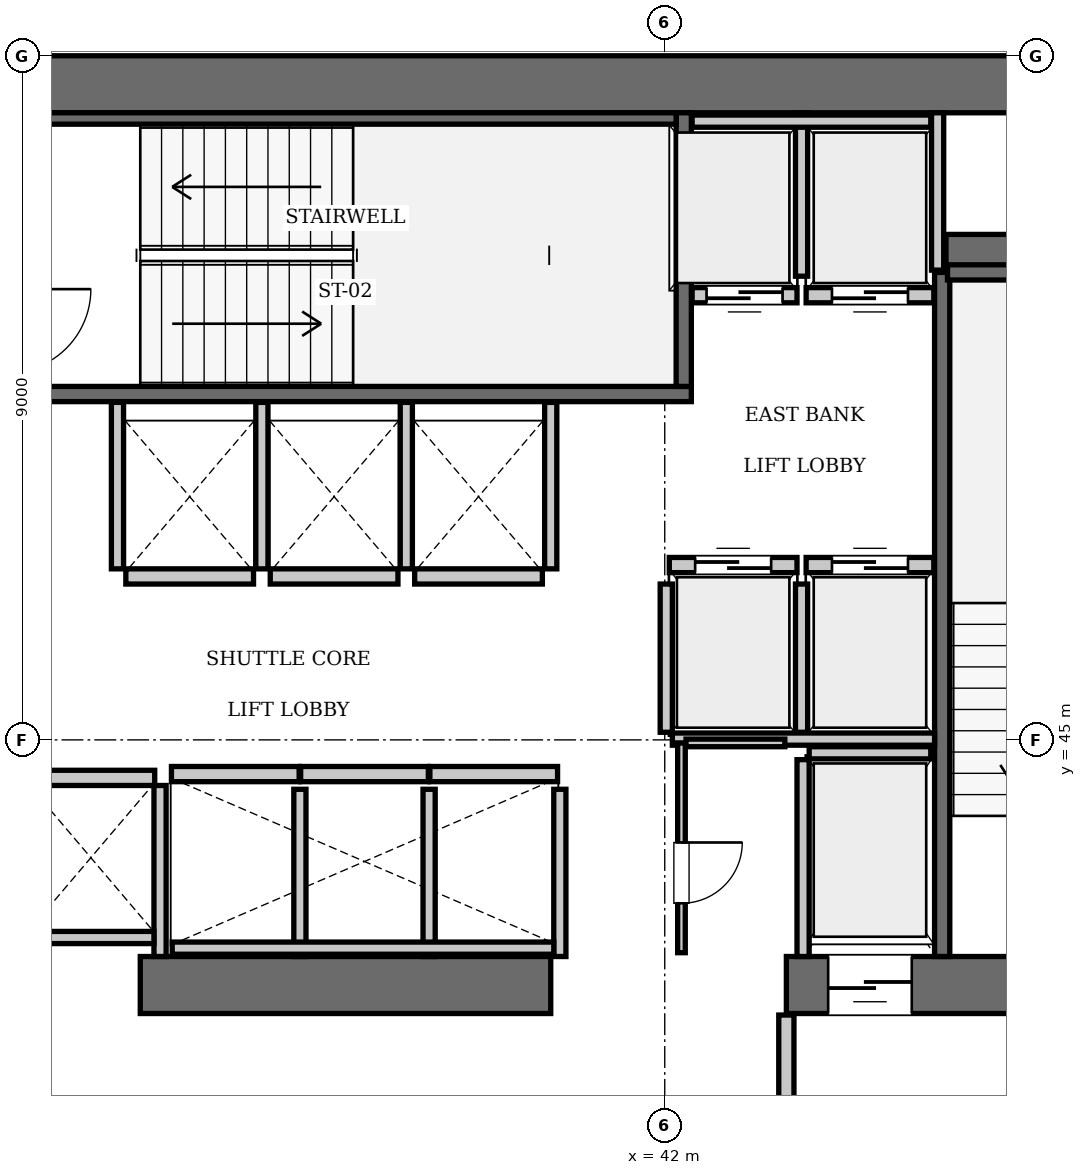
"""IFC4 building model, lengths in metres.
Left out: names, types, materials, properties, quantities, classifications, styles, units other than length and angle.
Written with IfcOpenShell. Run it as: python <this file> out.ifc"""

import sys

from ifc_helpers import new_model, si_unit, direction, frame, frame_2d, origin, place, context, subcontext, project, spatial, rectangle, extrude, element, fill, save


model = new_model("IFC4")
c1 = context("Model", 3, precision=1e-05, world=origin(), true_north=direction((0.0, 1.0)))
c2 = subcontext(c1, "Body", "Model", "MODEL_VIEW")
j1 = project(units=[si_unit("LENGTHUNIT", "METRE"), si_unit("PLANEANGLEUNIT", "RADIAN")], contexts=[c1])
p1 = place(None, origin())
s1 = spatial("IfcSite", under=j1, at=p1, CompositionType="ELEMENT")
p2 = place(p1, origin())
s2 = spatial("IfcBuilding", under=s1, at=p2, CompositionType="ELEMENT")
p3 = place(p2, frame((0.0, 0.0, 142.8)))
s3 = spatial("IfcBuildingStorey", under=s2, at=p3, CompositionType="ELEMENT", Elevation=142.8)
p4 = place(p3, frame((25.2, 53.625, 0.0), z_axis=(0.0, 0.0, 1.0), x_axis=(1.0, 0.0, 0.0)))
e1 = element("IfcWall", 1, at=p4, inside=s3, PredefinedType="SHEAR", context=c2, shape_type="SweptSolid", body=[
    extrude(rectangle(XDim=25.2, YDim=0.75, at=frame_2d((12.6, 0.0))), origin(), (0.0, 0.0, 1.0), 3.85),
])
p5 = place(p3, frame((35.1, 41.775, 0.0), z_axis=(0.0, 0.0, 1.0), x_axis=(1.0, 0.0, 0.0)))
e2 = element("IfcWall", 2, at=p5, inside=s3, PredefinedType="SHEAR", context=c2, shape_type="SweptSolid", body=[
    extrude(rectangle(XDim=5.4, YDim=0.75, at=frame_2d((2.7, 0.0))), origin(), (0.0, 0.0, 1.0), 3.85),
])
p6 = place(p3, frame((43.6, 41.775, 0.0), z_axis=(0.0, 0.0, 1.0), x_axis=(1.0, 0.0, 0.0)))
e3 = element("IfcWall", 3, at=p6, inside=s3, PredefinedType="SHEAR", context=c2, shape_type="SweptSolid", body=[
    extrude(rectangle(XDim=6.8, YDim=0.75, at=frame_2d((3.4, 0.0))), origin(), (0.0, 0.0, 1.0), 3.85),
])
p7 = place(p6, frame((3.9, 0.0, 0.0)))
e4 = element("IfcOpeningElement", 4, at=p7, cuts=e3, PredefinedType="OPENING", context=c2, shape_type="SweptSolid", body=[
    extrude(rectangle(XDim=1.15, YDim=2.15, at=frame_2d((0.575, 1.075))), frame((0.0, 0.385, 0.0), z_axis=(0.0, -1.0, 0.0), x_axis=(1.0, 0.0, 0.0)), (0.0, 0.0, 1.0), 0.77),
])
p8 = place(p6, frame((0.55, 0.0, 0.0)))
e5 = element("IfcOpeningElement", 5, at=p8, cuts=e3, PredefinedType="OPENING", context=c2, shape_type="SweptSolid", body=[
    extrude(rectangle(XDim=1.1, YDim=2.2, at=frame_2d((0.55, 1.1))), frame((0.0, 0.385, 0.0), z_axis=(0.0, -1.0, 0.0), x_axis=(1.0, 0.0, 0.0)), (0.0, 0.0, 1.0), 0.77),
])
p9 = place(p3, frame((45.7, 51.4, 0.0), z_axis=(0.0, 0.0, 1.0), x_axis=(1.0, 0.0, 0.0)))
e6 = element("IfcWall", 6, at=p9, inside=s3, PredefinedType="SHEAR", context=c2, shape_type="SweptSolid", body=[
    extrude(rectangle(XDim=3.95, YDim=0.5, at=frame_2d((1.975, 0.0))), origin(), (0.0, 0.0, 1.0), 3.85),
])
p10 = place(p3, frame((33.25, 49.55, 0.0), z_axis=(0.0, 0.0, 1.0), x_axis=(1.0, 0.0, 0.0)))
e7 = element("IfcWall", 7, at=p10, inside=s3, PredefinedType="SOLIDWALL", context=c2, shape_type="SweptSolid", body=[
    extrude(rectangle(XDim=9.1, YDim=0.2, at=frame_2d((4.55, 0.0))), origin(), (0.0, 0.0, 1.0), 3.61),
])
p11 = place(p3, frame((42.25, 49.65, 0.0), z_axis=(0.0, 0.0, 1.0), x_axis=(0.0, 1.0, 0.0)))
e8 = element("IfcWall", 8, at=p11, inside=s3, PredefinedType="SOLIDWALL", context=c2, shape_type="SweptSolid", body=[
    extrude(rectangle(XDim=3.6, YDim=0.2, at=frame_2d((1.8, 0.0))), origin(), (0.0, 0.0, 1.0), 3.61),
])
p12 = place(p3, frame((33.45, 53.175, 0.0), z_axis=(0.0, 0.0, 1.0), x_axis=(1.0, 0.0, 0.0)))
e9 = element("IfcWall", 9, at=p12, inside=s3, PredefinedType="SOLIDWALL", context=c2, shape_type="SweptSolid", body=[
    extrude(rectangle(XDim=8.7, YDim=0.15, at=frame_2d((4.35, 0.0))), origin(), (0.0, 0.0, 1.0), 3.61),
])
p13 = place(p3, frame((45.65, 42.15, 0.0), z_axis=(0.0, 0.0, 1.0), x_axis=(0.0, 1.0, 0.0)))
e10 = element("IfcWall", 10, at=p13, inside=s3, PredefinedType="SOLIDWALL", context=c2, shape_type="SweptSolid", body=[
    extrude(rectangle(XDim=9.0, YDim=0.2, at=frame_2d((4.5, 0.0))), origin(), (0.0, 0.0, 1.0), 3.61),
])
p14 = place(p3, frame((45.72, 51.15, 0.0), z_axis=(0.0, 0.0, 1.0), x_axis=(1.0, 0.0, 0.0)))
e11 = element("IfcWall", 11, at=p14, inside=s3, PredefinedType="SOLIDWALL", context=c2, shape_type="SweptSolid", body=[
    extrude(rectangle(XDim=3.5, YDim=0.2, at=frame_2d((1.75, 0.0))), origin(), (0.0, 0.0, 1.0), 3.61),
])
p15 = place(p3, frame((42.06, 47.3, 0.0), z_axis=(0.0, 0.0, 1.0), x_axis=(1.0, 0.0, 0.0)))
e12 = element("IfcWall", 12, at=p15, inside=s3, PredefinedType="SOLIDWALL", context=c2, shape_type="SweptSolid", body=[
    extrude(rectangle(XDim=1.68, YDim=0.2, at=frame_2d((0.84, 0.0))), origin(), (0.0, 0.0, 1.0), 3.61),
])
p16 = place(p15, frame((0.34, 0.0, 0.0)))
e13 = element("IfcOpeningElement", 13, at=p16, cuts=e12, PredefinedType="OPENING", context=c2, shape_type="SweptSolid", body=[
    extrude(rectangle(XDim=1.0, YDim=2.15, at=frame_2d((0.5, 1.075))), frame((0.0, 0.11, 0.0), z_axis=(0.0, -1.0, 0.0), x_axis=(1.0, 0.0, 0.0)), (0.0, 0.0, 1.0), 0.22),
])
p17 = place(p3, frame((43.86, 47.3, 0.0), z_axis=(0.0, 0.0, 1.0), x_axis=(1.0, 0.0, 0.0)))
e14 = element("IfcWall", 14, at=p17, inside=s3, PredefinedType="SOLIDWALL", context=c2, shape_type="SweptSolid", body=[
    extrude(rectangle(XDim=1.68, YDim=0.2, at=frame_2d((0.84, 0.0))), origin(), (0.0, 0.0, 1.0), 3.61),
])
p18 = place(p17, frame((0.34, 0.0, 0.0)))
e15 = element("IfcOpeningElement", 15, at=p18, cuts=e14, PredefinedType="OPENING", context=c2, shape_type="SweptSolid", body=[
    extrude(rectangle(XDim=1.0, YDim=2.15, at=frame_2d((0.5, 1.075))), frame((0.0, 0.11, 0.0), z_axis=(0.0, -1.0, 0.0), x_axis=(1.0, 0.0, 0.0)), (0.0, 0.0, 1.0), 0.22),
])
p19 = place(p3, frame((42.36, 50.85, 0.0), z_axis=(0.0, 0.0, 1.0), x_axis=(1.0, 0.0, 0.0)))
e16 = element("IfcWall", 16, at=p19, inside=s3, PredefinedType="SOLIDWALL", context=c2, shape_type="SweptSolid", body=[
    extrude(rectangle(XDim=1.38, YDim=0.2, at=frame_2d((0.69, 0.0))), origin(), (0.0, 0.0, 1.0), 3.61),
])
p20 = place(p19, frame((0.19, 0.0, 0.0)))
e17 = element("IfcOpeningElement", 17, at=p20, cuts=e16, PredefinedType="OPENING", context=c2, shape_type="SweptSolid", body=[
    extrude(rectangle(XDim=1.0, YDim=2.15, at=frame_2d((0.5, 1.075))), frame((0.0, 0.11, 0.0), z_axis=(0.0, -1.0, 0.0), x_axis=(1.0, 0.0, 0.0)), (0.0, 0.0, 1.0), 0.22),
])
p21 = place(p3, frame((43.86, 50.85, 0.0), z_axis=(0.0, 0.0, 1.0), x_axis=(1.0, 0.0, 0.0)))
e18 = element("IfcWall", 18, at=p21, inside=s3, PredefinedType="SOLIDWALL", context=c2, shape_type="SweptSolid", body=[
    extrude(rectangle(XDim=1.68, YDim=0.2, at=frame_2d((0.84, 0.0))), origin(), (0.0, 0.0, 1.0), 3.61),
])
p22 = place(p21, frame((0.34, 0.0, 0.0)))
e19 = element("IfcOpeningElement", 19, at=p22, cuts=e18, PredefinedType="OPENING", context=c2, shape_type="SweptSolid", body=[
    extrude(rectangle(XDim=1.0, YDim=2.15, at=frame_2d((0.5, 1.075))), frame((0.0, 0.11, 0.0), z_axis=(0.0, -1.0, 0.0), x_axis=(1.0, 0.0, 0.0)), (0.0, 0.0, 1.0), 0.22),
])
for number, where, z_axis, x_axis in (
    (20, (35.51, 44.55, 0.0), (0.0, 0.0, 1.0), (1.0, 0.0, 0.0)),
    (21, (37.21, 44.55, 0.0), (0.0, 0.0, 1.0), (1.0, 0.0, 0.0)),
):
    element("IfcWall", number, at=place(p3, frame(where, z_axis=z_axis, x_axis=x_axis)), inside=s3, PredefinedType="SOLIDWALL", context=c2, shape_type="SweptSolid", body=[
        extrude(rectangle(XDim=1.68, YDim=0.2, at=frame_2d((0.84, 0.0))), origin(), (0.0, 0.0, 1.0), 3.61),
    ])
for number, where, z_axis, x_axis in (
    (22, (38.91, 44.55, 0.0), (0.0, 0.0, 1.0), (1.0, 0.0, 0.0)),
    (23, (34.91, 47.15, 0.0), (0.0, 0.0, 1.0), (1.0, 0.0, 0.0)),
):
    element("IfcWall", number, at=place(p3, frame(where, z_axis=z_axis, x_axis=x_axis)), inside=s3, PredefinedType="SOLIDWALL", context=c2, shape_type="SweptSolid", body=[
        extrude(rectangle(XDim=1.68, YDim=0.2, at=frame_2d((0.84, 0.0))), origin(), (0.0, 0.0, 1.0), 3.61),
    ])
for number, where, z_axis, x_axis in (
    (24, (36.81, 47.15, 0.0), (0.0, 0.0, 1.0), (1.0, 0.0, 0.0)),
    (25, (38.71, 47.15, 0.0), (0.0, 0.0, 1.0), (1.0, 0.0, 0.0)),
    (26, (33.61, 44.5, 0.0), (0.0, 0.0, 1.0), (1.0, 0.0, 0.0)),
):
    element("IfcWall", number, at=place(p3, frame(where, z_axis=z_axis, x_axis=x_axis)), inside=s3, PredefinedType="SOLIDWALL", context=c2, shape_type="SweptSolid", body=[
        extrude(rectangle(XDim=1.68, YDim=0.2, at=frame_2d((0.84, 0.0))), origin(), (0.0, 0.0, 1.0), 3.61),
    ])
p23 = place(p3, frame((43.9, 44.83, 0.0), z_axis=(0.0, 0.0, 1.0), x_axis=(1.0, 0.0, 0.0)))
e27 = element("IfcWall", 27, at=p23, inside=s3, PredefinedType="SOLIDWALL", context=c2, shape_type="SweptSolid", body=[
    extrude(rectangle(XDim=1.6, YDim=0.16, at=frame_2d((0.8, 0.0))), origin(), (0.0, 0.0, 1.0), 3.61),
])
p24 = place(p3, frame((43.82, 42.15, 0.0), z_axis=(0.0, 0.0, 1.0), x_axis=(0.0, 1.0, 0.0)))
e28 = element("IfcWall", 28, at=p24, inside=s3, PredefinedType="SOLIDWALL", context=c2, shape_type="SweptSolid", body=[
    extrude(rectangle(XDim=2.59, YDim=0.16, at=frame_2d((1.295, 0.0))), origin(), (0.0, 0.0, 1.0), 3.61),
])
for number, where, z_axis, x_axis in (
    (29, (42.02, 45.1, 0.0), (0.0, 0.0, 1.0), (0.0, 1.0, 0.0)),
    (30, (43.8, 45.1, 0.0), (0.0, 0.0, 1.0), (0.0, 1.0, 0.0)),
):
    element("IfcWall", number, at=place(p3, frame(where, z_axis=z_axis, x_axis=x_axis)), inside=s3, PredefinedType="SOLIDWALL", context=c2, shape_type="SweptSolid", body=[
        extrude(rectangle(XDim=1.95, YDim=0.16, at=frame_2d((0.975, 0.0))), origin(), (0.0, 0.0, 1.0), 3.61),
    ])
p25 = place(p3, frame((42.1, 45.01, 0.0), z_axis=(0.0, 0.0, 1.0), x_axis=(1.0, 0.0, 0.0)))
e31 = element("IfcWall", 31, at=p25, inside=s3, PredefinedType="SOLIDWALL", context=c2, shape_type="SweptSolid", body=[
    extrude(rectangle(XDim=3.45, YDim=0.16, at=frame_2d((1.725, 0.0))), origin(), (0.0, 0.0, 1.0), 3.61),
])
p26 = place(p3, frame((45.59, 51.18, 0.0), z_axis=(0.0, 0.0, 1.0), x_axis=(0.0, 1.0, 0.0)))
e32 = element("IfcWall", 32, at=p26, inside=s3, PredefinedType="SOLIDWALL", context=c2, shape_type="SweptSolid", body=[
    extrude(rectangle(XDim=2.07, YDim=0.16, at=frame_2d((1.035, 0.0))), origin(), (0.0, 0.0, 1.0), 3.61),
])
p27 = place(p3, frame((43.8, 51.1, 0.0), z_axis=(0.0, 0.0, 1.0), x_axis=(0.0, 1.0, 0.0)))
e33 = element("IfcWall", 33, at=p27, inside=s3, PredefinedType="SOLIDWALL", context=c2, shape_type="SweptSolid", body=[
    extrude(rectangle(XDim=2.15, YDim=0.16, at=frame_2d((1.075, 0.0))), origin(), (0.0, 0.0, 1.0), 3.61),
])
p28 = place(p3, frame((42.36, 53.14, 0.0), z_axis=(0.0, 0.0, 1.0), x_axis=(1.0, 0.0, 0.0)))
e34 = element("IfcWall", 34, at=p28, inside=s3, PredefinedType="SOLIDWALL", context=c2, shape_type="SweptSolid", body=[
    extrude(rectangle(XDim=3.14, YDim=0.16, at=frame_2d((1.57, 0.0))), origin(), (0.0, 0.0, 1.0), 3.61),
])
for number, where, z_axis, x_axis in (
    (35, (37.2, 42.15, 0.0), (0.0, 0.0, 1.0), (0.0, 1.0, 0.0)),
    (36, (38.9, 42.15, 0.0), (0.0, 0.0, 1.0), (0.0, 1.0, 0.0)),
    (37, (40.62, 42.15, 0.0), (0.0, 0.0, 1.0), (0.0, 1.0, 0.0)),
):
    element("IfcWall", number, at=place(p3, frame(where, z_axis=z_axis, x_axis=x_axis)), inside=s3, PredefinedType="SOLIDWALL", context=c2, shape_type="SweptSolid", body=[
        extrude(rectangle(XDim=2.2, YDim=0.16, at=frame_2d((1.1, 0.0))), origin(), (0.0, 0.0, 1.0), 3.61),
    ])
p29 = place(p3, frame((35.52, 42.26, 0.0), z_axis=(0.0, 0.0, 1.0), x_axis=(1.0, 0.0, 0.0)))
e38 = element("IfcWall", 38, at=p29, inside=s3, PredefinedType="SOLIDWALL", context=c2, shape_type="SweptSolid", body=[
    extrude(rectangle(XDim=5.02, YDim=0.16, at=frame_2d((2.51, 0.0))), origin(), (0.0, 0.0, 1.0), 3.61),
])
for number, where, z_axis, x_axis in (
    (39, (34.8, 47.25, 0.0), (0.0, 0.0, 1.0), (0.0, 1.0, 0.0)),
    (40, (36.7, 47.25, 0.0), (0.0, 0.0, 1.0), (0.0, 1.0, 0.0)),
    (41, (38.6, 47.25, 0.0), (0.0, 0.0, 1.0), (0.0, 1.0, 0.0)),
    (42, (40.5, 47.25, 0.0), (0.0, 0.0, 1.0), (0.0, 1.0, 0.0)),
):
    element("IfcWall", number, at=place(p3, frame(where, z_axis=z_axis, x_axis=x_axis)), inside=s3, PredefinedType="SOLIDWALL", context=c2, shape_type="SweptSolid", body=[
        extrude(rectangle(XDim=2.19, YDim=0.16, at=frame_2d((1.095, 0.0))), origin(), (0.0, 0.0, 1.0), 3.61),
    ])
p30 = place(p3, frame((35.36, 42.15, 0.0), z_axis=(0.0, 0.0, 1.0), x_axis=(0.0, 1.0, 0.0)))
e43 = element("IfcWall", 43, at=p30, inside=s3, PredefinedType="SOLIDWALL", context=c2, shape_type="SweptSolid", body=[
    extrude(rectangle(XDim=2.25, YDim=0.16, at=frame_2d((1.125, 0.0))), origin(), (0.0, 0.0, 1.0), 3.61),
])
p31 = place(p3, frame((33.62, 42.4, 0.0), z_axis=(0.0, 0.0, 1.0), x_axis=(1.0, 0.0, 0.0)))
e44 = element("IfcWall", 44, at=p31, inside=s3, PredefinedType="SOLIDWALL", context=c2, shape_type="SweptSolid", body=[
    extrude(rectangle(XDim=1.66, YDim=0.16, at=frame_2d((0.83, 0.0))), origin(), (0.0, 0.0, 1.0), 3.61),
])
p32 = place(p3, frame((43.6, 38.31, 0.0), z_axis=(0.0, 0.0, 1.0), x_axis=(0.0, 1.0, 0.0)))
e45 = element("IfcWall", 45, at=p32, inside=s3, PredefinedType="PARTITIONING", context=c2, shape_type="SweptSolid", body=[
    extrude(rectangle(XDim=3.07, YDim=0.2, at=frame_2d((1.535, 0.0))), origin(), (0.0, 0.0, 1.0), 3.61),
])
p33 = place(p3, frame((42.22, 42.2, 0.0), z_axis=(0.0, 0.0, 1.0), x_axis=(0.0, 1.0, 0.0)))
e46 = element("IfcWall", 46, at=p33, inside=s3, PredefinedType="PARTITIONING", context=c2, shape_type="SweptSolid", body=[
    extrude(rectangle(XDim=2.76, YDim=0.1, at=frame_2d((1.38, 0.0))), origin(), (0.0, 0.0, 1.0), 3.61),
])
p34 = place(p33, frame((0.65, 0.0, 0.0)))
e47 = element("IfcOpeningElement", 47, at=p34, cuts=e46, PredefinedType="OPENING", context=c2, shape_type="SweptSolid", body=[
    extrude(rectangle(XDim=0.8, YDim=2.05, at=frame_2d((0.4, 1.025))), frame((0.0, 0.06, 0.0), z_axis=(0.0, -1.0, 0.0), x_axis=(1.0, 0.0, 0.0)), (0.0, 0.0, 1.0), 0.12),
])
p35 = place(p3, frame((42.28, 44.96, 0.0), z_axis=(0.0, 0.0, 1.0), x_axis=(1.0, 0.0, 0.0)))
e48 = element("IfcWall", 48, at=p35, inside=s3, PredefinedType="PARTITIONING", context=c2, shape_type="SweptSolid", body=[
    extrude(rectangle(XDim=1.3, YDim=0.1, at=frame_2d((0.65, 0.0))), origin(), (0.0, 0.0, 1.0), 3.61),
])
p36 = place(p16, origin())
e49 = element("IfcDoor", 49, at=p36, inside=s3, OperationType="SLIDING_TO_LEFT", PredefinedType="DOOR", context=c2, shape_type="SweptSolid", body=[
    extrude(rectangle(XDim=1.0, YDim=2.15, at=frame_2d((0.5, 1.075))), frame((0.0, 0.025, 0.0), z_axis=(0.0, -1.0, 0.0), x_axis=(1.0, 0.0, 0.0)), (0.0, 0.0, 1.0), 0.05),
])
fill(e13, e49)
p37 = place(p18, origin())
e50 = element("IfcDoor", 50, at=p37, inside=s3, OperationType="SLIDING_TO_LEFT", PredefinedType="DOOR", context=c2, shape_type="SweptSolid", body=[
    extrude(rectangle(XDim=1.0, YDim=2.15, at=frame_2d((0.5, 1.075))), frame((0.0, 0.025, 0.0), z_axis=(0.0, -1.0, 0.0), x_axis=(1.0, 0.0, 0.0)), (0.0, 0.0, 1.0), 0.05),
])
fill(e15, e50)
p38 = place(p20, frame((1.0, 0.0, 0.0), z_axis=(0.0, 0.0, 1.0), x_axis=(-1.0, 0.0, 0.0)))
e51 = element("IfcDoor", 51, at=p38, inside=s3, OperationType="SLIDING_TO_LEFT", PredefinedType="DOOR", context=c2, shape_type="SweptSolid", body=[
    extrude(rectangle(XDim=1.0, YDim=2.15, at=frame_2d((0.5, 1.075))), frame((0.0, 0.025, 0.0), z_axis=(0.0, -1.0, 0.0), x_axis=(1.0, 0.0, 0.0)), (0.0, 0.0, 1.0), 0.05),
])
fill(e17, e51)
p39 = place(p22, frame((1.0, 0.0, 0.0), z_axis=(0.0, 0.0, 1.0), x_axis=(-1.0, 0.0, 0.0)))
e52 = element("IfcDoor", 52, at=p39, inside=s3, OperationType="SLIDING_TO_LEFT", PredefinedType="DOOR", context=c2, shape_type="SweptSolid", body=[
    extrude(rectangle(XDim=1.0, YDim=2.15, at=frame_2d((0.5, 1.075))), frame((0.0, 0.025, 0.0), z_axis=(0.0, -1.0, 0.0), x_axis=(1.0, 0.0, 0.0)), (0.0, 0.0, 1.0), 0.05),
])
fill(e19, e52)
p40 = place(p8, frame((1.1, 0.0, 0.0), z_axis=(0.0, 0.0, 1.0), x_axis=(-1.0, 0.0, 0.0)))
e53 = element("IfcDoor", 53, at=p40, inside=s3, OperationType="SLIDING_TO_LEFT", PredefinedType="DOOR", context=c2, shape_type="SweptSolid", body=[
    extrude(rectangle(XDim=1.1, YDim=2.2, at=frame_2d((0.55, 1.1))), frame((0.0, 0.025, 0.0), z_axis=(0.0, -1.0, 0.0), x_axis=(1.0, 0.0, 0.0)), (0.0, 0.0, 1.0), 0.05),
])
fill(e5, e53)
p41 = place(p34, frame((0.8, 0.0, 0.0), z_axis=(0.0, 0.0, 1.0), x_axis=(-1.0, 0.0, 0.0)))
e54 = element("IfcDoor", 54, at=p41, inside=s3, OperationType="SINGLE_SWING_LEFT", PredefinedType="DOOR", context=c2, shape_type="SweptSolid", body=[
    extrude(rectangle(XDim=0.8, YDim=2.05, at=frame_2d((0.4, 1.025))), frame((0.0, 0.025, 0.0), z_axis=(0.0, -1.0, 0.0), x_axis=(1.0, 0.0, 0.0)), (0.0, 0.0, 1.0), 0.05),
])
fill(e47, e54)
save(model, sys.argv[1])
